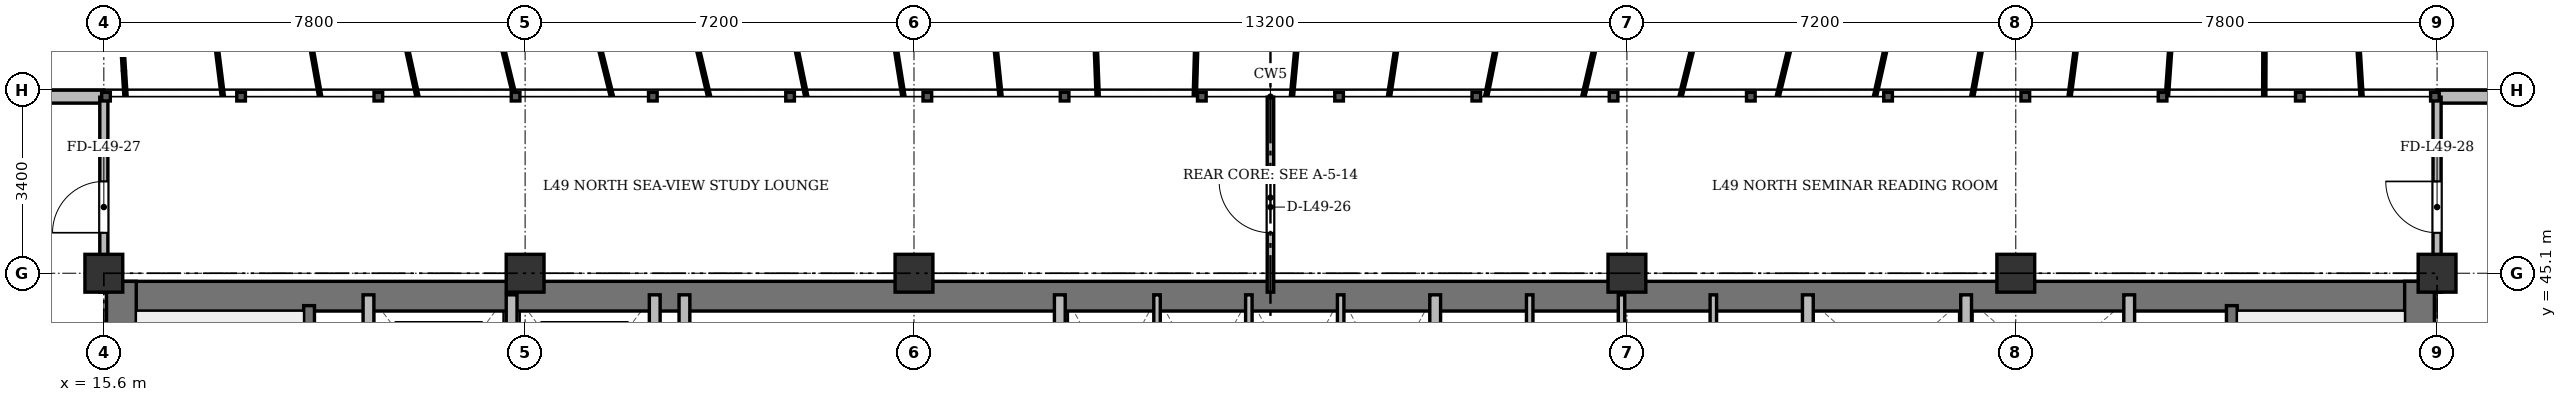
"""IFC4 building model, lengths in metres.
Left out: names, types, materials, properties, quantities, classifications, styles, units other than length and angle.
Written with IfcOpenShell. Run it as: python <this file> out.ifc"""

import sys

from ifc_helpers import new_model, si_unit, direction, frame, frame_2d, origin, origin_2d, place, context, subcontext, project, spatial, rectangle, extrude, source, transform, mapped, element, fill, save


model = new_model("IFC4")
c1 = context("Model", 3, precision=1e-05, world=origin(), true_north=direction((0.0, 1.0)))
c2 = subcontext(c1, "Body", "Model", "MODEL_VIEW")
j1 = project(units=[si_unit("LENGTHUNIT", "METRE"), si_unit("PLANEANGLEUNIT", "RADIAN")], contexts=[c1])
p1 = place(None, origin())
s1 = spatial("IfcSite", under=j1, at=p1, CompositionType="ELEMENT")
p2 = place(p1, origin())
s2 = spatial("IfcBuilding", under=s1, at=p2, CompositionType="ELEMENT")
p3 = place(p2, frame((0.0, 0.0, 190.5)))
s3 = spatial("IfcBuildingStorey", under=s2, at=p3, CompositionType="ELEMENT", Elevation=190.5)
m1 = source(origin(), c2, "Body", "SweptSolid", [
    extrude(rectangle(XDim=0.7, YDim=0.7, at=origin_2d()), origin(), (0.0, 0.0, 1.0), 3.6),
])
for number, where, z_axis, x_axis in (
    (1, (15.6, 45.1, 0.0), (0.0, 0.0, 1.0), (1.0, 0.0, 0.0)),
    (2, (23.4, 45.1, 0.0), (0.0, 0.0, 1.0), (1.0, 0.0, 0.0)),
    (3, (30.6, 45.1, 0.0), (0.0, 0.0, 1.0), (1.0, 0.0, 0.0)),
    (4, (43.8, 45.1, 0.0), (0.0, 0.0, 1.0), (1.0, 0.0, 0.0)),
    (5, (51.0, 45.1, 0.0), (0.0, 0.0, 1.0), (1.0, 0.0, 0.0)),
    (6, (58.8, 45.1, 0.0), (0.0, 0.0, 1.0), (1.0, 0.0, 0.0)),
):
    element("IfcColumn", number, at=place(p3, frame(where, z_axis=z_axis, x_axis=x_axis)), inside=s3, PredefinedType="COLUMN", context=c2, shape_type="MappedRepresentation", body=[
        mapped(m1, transform((0.0, 0.0, 0.0), x_axis=(1.0, 0.0, 0.0), y_axis=(0.0, 1.0, 0.0), z_axis=(0.0, 0.0, 1.0), scale=1.0)),
    ])
p4 = place(p3, frame((11.1, 48.37, 0.0), z_axis=(0.0, 0.0, 1.0), x_axis=(1.0, 0.0, 0.0)))
e7 = element("IfcWall", 7, at=p4, inside=s3, PredefinedType="SOLIDWALL", context=c2, shape_type="SweptSolid", body=[
    extrude(rectangle(XDim=4.5, YDim=0.24, at=frame_2d((2.25, 0.0))), origin(), (0.0, 0.0, 1.0), 3.36),
])
p5 = place(p4, frame((2.003, 0.0, 0.9)))
e8 = element("IfcOpeningElement", 8, at=p5, cuts=e7, PredefinedType="OPENING", context=c2, shape_type="SweptSolid", body=[
    extrude(rectangle(XDim=1.35, YDim=1.5, at=frame_2d((0.675, 0.75))), frame((0.0, 0.13, 0.0), z_axis=(0.0, -1.0, 0.0), x_axis=(1.0, 0.0, 0.0)), (0.0, 0.0, 1.0), 0.26),
])
p6 = place(p3, frame((58.8, 48.37, 0.0), z_axis=(0.0, 0.0, 1.0), x_axis=(1.0, 0.0, 0.0)))
e9 = element("IfcWall", 9, at=p6, inside=s3, PredefinedType="SOLIDWALL", context=c2, shape_type="SweptSolid", body=[
    extrude(rectangle(XDim=4.5, YDim=0.24, at=frame_2d((2.25, 0.0))), origin(), (0.0, 0.0, 1.0), 3.36),
])
p7 = place(p6, frame((1.483, 0.0, 0.9)))
e10 = element("IfcOpeningElement", 10, at=p7, cuts=e9, PredefinedType="OPENING", context=c2, shape_type="SweptSolid", body=[
    extrude(rectangle(XDim=1.35, YDim=1.5, at=frame_2d((0.675, 0.75))), frame((0.0, 0.13, 0.0), z_axis=(0.0, -1.0, 0.0), x_axis=(1.0, 0.0, 0.0)), (0.0, 0.0, 1.0), 0.26),
])
p8 = place(p3, frame((15.65, 44.675, 0.0), z_axis=(0.0, 0.0, 1.0), x_axis=(1.0, 0.0, 0.0)))
e11 = element("IfcWall", 11, at=p8, inside=s3, PredefinedType="SHEAR", context=c2, shape_type="SweptSolid", body=[
    extrude(rectangle(XDim=43.1, YDim=0.55, at=frame_2d((21.55, 0.0))), origin(), (0.0, 0.0, 1.0), 3.36),
])
for number, where, z_axis, x_axis in (
    (12, (15.925, 33.4, 0.0), (0.0, 0.0, 1.0), (0.0, 1.0, 0.0)),
    (13, (58.475, 33.4, 0.0), (0.0, 0.0, 1.0), (0.0, 1.0, 0.0)),
):
    element("IfcWall", number, at=place(p3, frame(where, z_axis=z_axis, x_axis=x_axis)), inside=s3, PredefinedType="SHEAR", context=c2, shape_type="SweptSolid", body=[
        extrude(rectangle(XDim=11.55, YDim=0.55, at=frame_2d((5.775, 0.0))), origin(), (0.0, 0.0, 1.0), 3.36),
    ])
p9 = place(p3, frame((19.4, 33.4, 0.0), z_axis=(0.0, 0.0, 1.0), x_axis=(0.0, 1.0, 0.0)))
e14 = element("IfcWall", 14, at=p9, inside=s3, PredefinedType="SHEAR", context=c2, shape_type="SweptSolid", body=[
    extrude(rectangle(XDim=11.1, YDim=0.2, at=frame_2d((5.55, 0.0))), origin(), (0.0, 0.0, 1.0), 3.36),
])
p10 = place(p9, frame((0.85, 0.0, 0.0)))
e15 = element("IfcOpeningElement", 15, at=p10, cuts=e14, PredefinedType="OPENING", context=c2, shape_type="SweptSolid", body=[
    extrude(rectangle(XDim=1.1, YDim=2.15, at=frame_2d((0.55, 1.075))), frame((0.0, 0.11, 0.0), z_axis=(0.0, -1.0, 0.0), x_axis=(1.0, 0.0, 0.0)), (0.0, 0.0, 1.0), 0.22),
])
p11 = place(p3, frame((55.0, 33.4, 0.0), z_axis=(0.0, 0.0, 1.0), x_axis=(0.0, 1.0, 0.0)))
e16 = element("IfcWall", 16, at=p11, inside=s3, PredefinedType="SHEAR", context=c2, shape_type="SweptSolid", body=[
    extrude(rectangle(XDim=11.1, YDim=0.2, at=frame_2d((5.55, 0.0))), origin(), (0.0, 0.0, 1.0), 3.36),
])
p12 = place(p11, frame((0.85, 0.0, 0.0)))
e17 = element("IfcOpeningElement", 17, at=p12, cuts=e16, PredefinedType="OPENING", context=c2, shape_type="SweptSolid", body=[
    extrude(rectangle(XDim=1.1, YDim=2.15, at=frame_2d((0.55, 1.075))), frame((0.0, 0.11, 0.0), z_axis=(0.0, -1.0, 0.0), x_axis=(1.0, 0.0, 0.0)), (0.0, 0.0, 1.0), 0.22),
])
for number, where, z_axis, x_axis in (
    (18, (20.5, 41.3, 0.0), (0.0, 0.0, 1.0), (0.0, 1.0, 0.0)),
    (19, (23.15, 41.3, 0.0), (0.0, 0.0, 1.0), (0.0, 1.0, 0.0)),
    (20, (25.8, 41.3, 0.0), (0.0, 0.0, 1.0), (0.0, 1.0, 0.0)),
):
    element("IfcWall", number, at=place(p3, frame(where, z_axis=z_axis, x_axis=x_axis)), inside=s3, PredefinedType="SOLIDWALL", context=c2, shape_type="SweptSolid", body=[
        extrude(rectangle(XDim=3.4, YDim=0.2, at=frame_2d((1.7, 0.0))), origin(), (0.0, 0.0, 1.0), 3.36),
    ])
for number, where, z_axis, x_axis in (
    (21, (26.35, 33.4, 0.0), (0.0, 0.0, 1.0), (0.0, 1.0, 0.0)),
    (22, (33.3, 33.4, 0.0), (0.0, 0.0, 1.0), (0.0, 1.0, 0.0)),
):
    element("IfcWall", number, at=place(p3, frame(where, z_axis=z_axis, x_axis=x_axis)), inside=s3, PredefinedType="SOLIDWALL", context=c2, shape_type="SweptSolid", body=[
        extrude(rectangle(XDim=11.3, YDim=0.2, at=frame_2d((5.65, 0.0))), origin(), (0.0, 0.0, 1.0), 2.91),
    ])
for number, where, z_axis, x_axis in (
    (23, (35.1, 41.5, 0.0), (0.0, 0.0, 1.0), (0.0, 1.0, 0.0)),
    (24, (36.8, 41.5, 0.0), (0.0, 0.0, 1.0), (0.0, 1.0, 0.0)),
    (25, (38.5, 41.5, 0.0), (0.0, 0.0, 1.0), (0.0, 1.0, 0.0)),
):
    element("IfcWall", number, at=place(p3, frame(where, z_axis=z_axis, x_axis=x_axis)), inside=s3, PredefinedType="PARTITIONING", context=c2, shape_type="SweptSolid", body=[
        extrude(rectangle(XDim=3.2, YDim=0.12, at=frame_2d((1.6, 0.0))), origin(), (0.0, 0.0, 1.0), 3.36),
    ])
p13 = place(p3, frame((40.25, 41.5, 0.0), z_axis=(0.0, 0.0, 1.0), x_axis=(0.0, 1.0, 0.0)))
e26 = element("IfcWall", 26, at=p13, inside=s3, PredefinedType="SOLIDWALL", context=c2, shape_type="SweptSolid", body=[
    extrude(rectangle(XDim=3.2, YDim=0.2, at=frame_2d((1.6, 0.0))), origin(), (0.0, 0.0, 1.0), 3.36),
])
p14 = place(p3, frame((42.0, 41.5, 0.0), z_axis=(0.0, 0.0, 1.0), x_axis=(0.0, 1.0, 0.0)))
e27 = element("IfcWall", 27, at=p14, inside=s3, PredefinedType="PARTITIONING", context=c2, shape_type="SweptSolid", body=[
    extrude(rectangle(XDim=3.2, YDim=0.12, at=frame_2d((1.6, 0.0))), origin(), (0.0, 0.0, 1.0), 3.36),
])
p15 = place(p3, frame((43.7, 41.5, 0.0), z_axis=(0.0, 0.0, 1.0), x_axis=(0.0, 1.0, 0.0)))
e28 = element("IfcWall", 28, at=p15, inside=s3, PredefinedType="PARTITIONING", context=c2, shape_type="SweptSolid", body=[
    extrude(rectangle(XDim=3.2, YDim=0.12, at=frame_2d((1.6, 0.0))), origin(), (0.0, 0.0, 1.0), 2.86),
])
p16 = place(p3, frame((45.4, 41.5, 0.0), z_axis=(0.0, 0.0, 1.0), x_axis=(0.0, 1.0, 0.0)))
e29 = element("IfcWall", 29, at=p16, inside=s3, PredefinedType="PARTITIONING", context=c2, shape_type="SweptSolid", body=[
    extrude(rectangle(XDim=3.2, YDim=0.12, at=frame_2d((1.6, 0.0))), origin(), (0.0, 0.0, 1.0), 3.36),
])
p17 = place(p3, frame((47.15, 33.4, 0.0), z_axis=(0.0, 0.0, 1.0), x_axis=(0.0, 1.0, 0.0)))
e30 = element("IfcWall", 30, at=p17, inside=s3, PredefinedType="SOLIDWALL", context=c2, shape_type="SweptSolid", body=[
    extrude(rectangle(XDim=11.3, YDim=0.2, at=frame_2d((5.65, 0.0))), origin(), (0.0, 0.0, 1.0), 2.91),
])
for number, where, z_axis, x_axis in (
    (31, (50.08, 42.05, 0.0), (0.0, 0.0, 1.0), (0.0, 1.0, 0.0)),
    (32, (53.1, 42.05, 0.0), (0.0, 0.0, 1.0), (0.0, 1.0, 0.0)),
):
    element("IfcWall", number, at=place(p3, frame(where, z_axis=z_axis, x_axis=x_axis)), inside=s3, PredefinedType="SOLIDWALL", context=c2, shape_type="SweptSolid", body=[
        extrude(rectangle(XDim=2.65, YDim=0.2, at=frame_2d((1.325, 0.0))), origin(), (0.0, 0.0, 1.0), 3.36),
    ])
p18 = place(p3, frame((37.2, 44.75, 0.0), z_axis=(0.0, 0.0, 1.0), x_axis=(0.0, 1.0, 0.0)))
e33 = element("IfcWall", 33, at=p18, inside=s3, PredefinedType="PARTITIONING", context=c2, shape_type="SweptSolid", body=[
    extrude(rectangle(XDim=3.61, YDim=0.12, at=frame_2d((1.805, 0.0))), origin(), (0.0, 0.0, 1.0), 2.91),
])
p19 = place(p18, frame((1.1, 0.0, 0.0)))
e34 = element("IfcOpeningElement", 34, at=p19, cuts=e33, PredefinedType="OPENING", context=c2, shape_type="SweptSolid", body=[
    extrude(rectangle(XDim=0.95, YDim=2.15, at=frame_2d((0.475, 1.075))), frame((0.0, 0.07, 0.0), z_axis=(0.0, -1.0, 0.0), x_axis=(1.0, 0.0, 0.0)), (0.0, 0.0, 1.0), 0.14),
])
p20 = place(p3, frame((15.6, 44.75, 0.0), z_axis=(0.0, 0.0, 1.0), x_axis=(0.0, 1.0, 0.0)))
e35 = element("IfcWall", 35, at=p20, inside=s3, PredefinedType="PARTITIONING", context=c2, shape_type="SweptSolid", body=[
    extrude(rectangle(XDim=3.61, YDim=0.15, at=frame_2d((1.805, 0.0))), origin(), (0.0, 0.0, 1.0), 2.86),
])
p21 = place(p20, frame((1.1, 0.0, 0.0)))
e36 = element("IfcOpeningElement", 36, at=p21, cuts=e35, PredefinedType="OPENING", context=c2, shape_type="SweptSolid", body=[
    extrude(rectangle(XDim=0.95, YDim=2.15, at=frame_2d((0.475, 1.075))), frame((0.0, 0.085, 0.0), z_axis=(0.0, -1.0, 0.0), x_axis=(1.0, 0.0, 0.0)), (0.0, 0.0, 1.0), 0.17),
])
p22 = place(p3, frame((58.8, 44.75, 0.0), z_axis=(0.0, 0.0, 1.0), x_axis=(0.0, 1.0, 0.0)))
e37 = element("IfcWall", 37, at=p22, inside=s3, PredefinedType="PARTITIONING", context=c2, shape_type="SweptSolid", body=[
    extrude(rectangle(XDim=3.61, YDim=0.15, at=frame_2d((1.805, 0.0))), origin(), (0.0, 0.0, 1.0), 2.86),
])
p23 = place(p22, frame((1.1, 0.0, 0.0)))
e38 = element("IfcOpeningElement", 38, at=p23, cuts=e37, PredefinedType="OPENING", context=c2, shape_type="SweptSolid", body=[
    extrude(rectangle(XDim=0.95, YDim=2.15, at=frame_2d((0.475, 1.075))), frame((0.0, 0.085, 0.0), z_axis=(0.0, -1.0, 0.0), x_axis=(1.0, 0.0, 0.0)), (0.0, 0.0, 1.0), 0.17),
])
m2 = source(origin(), c2, "Body", "SweptSolid", [
    extrude(rectangle(XDim=0.95, YDim=2.15, at=frame_2d((0.475, 1.075))), frame((0.0, 0.025, 0.0), z_axis=(0.0, -1.0, 0.0), x_axis=(1.0, 0.0, 0.0)), (0.0, 0.0, 1.0), 0.05),
])
p24 = place(p19, origin())
e39 = element("IfcDoor", 39, at=p24, inside=s3, OperationType="SINGLE_SWING_RIGHT", PredefinedType="DOOR", context=c2, shape_type="MappedRepresentation", body=[
    mapped(m2, transform((0.0, 0.0, 0.0), x_axis=(1.0, 0.0, 0.0), y_axis=(0.0, 1.0, 0.0), z_axis=(0.0, 0.0, 1.0), scale=1.0)),
])
fill(e34, e39)
p25 = place(p21, origin())
e40 = element("IfcDoor", 40, at=p25, inside=s3, OperationType="SINGLE_SWING_LEFT", PredefinedType="DOOR", context=c2, shape_type="MappedRepresentation", body=[
    mapped(m2, transform((0.0, 0.0, 0.0), x_axis=(1.0, 0.0, 0.0), y_axis=(0.0, 1.0, 0.0), z_axis=(0.0, 0.0, 1.0), scale=1.0)),
])
fill(e36, e40)
p26 = place(p23, origin())
e41 = element("IfcDoor", 41, at=p26, inside=s3, OperationType="SINGLE_SWING_RIGHT", PredefinedType="DOOR", context=c2, shape_type="MappedRepresentation", body=[
    mapped(m2, transform((0.0, 0.0, 0.0), x_axis=(1.0, 0.0, 0.0), y_axis=(0.0, 1.0, 0.0), z_axis=(0.0, 0.0, 1.0), scale=1.0)),
])
fill(e38, e41)
save(model, sys.argv[1])
